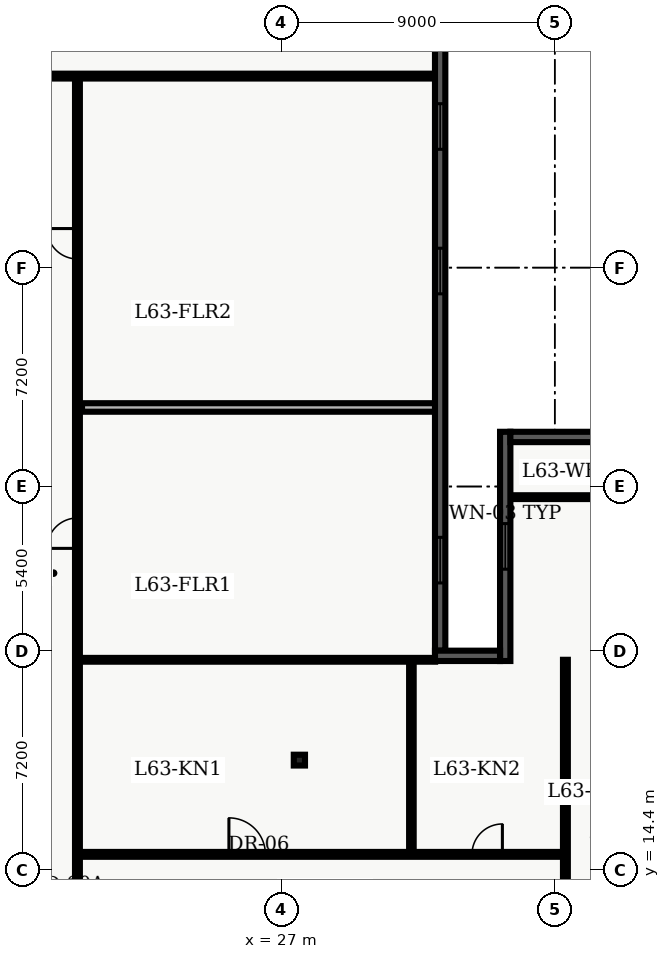
"""IFC4 building model, lengths in metres.
Left out: names, types, materials, properties, quantities, classifications, styles, units other than length and angle.
Written with IfcOpenShell. Run it as: python <this file> out.ifc"""

import sys

from ifc_helpers import new_model, entity, si_unit, converted_unit, direction, frame, origin_with_axes, origin_2d_with_axis, place, context, subcontext, project, spatial, polyline, rectangle, i_section, outline, extrude, element, fill, save


model = new_model("IFC4")
c1 = context("Model", 3, precision=1e-05, world=origin_with_axes(), true_north=direction((0.0, 1.0)))
c2 = subcontext(c1, "Body", "Model", "MODEL_VIEW")
j1 = project(units=[si_unit("LENGTHUNIT", "METRE"), converted_unit("PLANEANGLEUNIT", "DEGREE", entity("IfcPlaneAngleMeasure", 0.017), si_unit("PLANEANGLEUNIT", "RADIAN"), dimensions=[0, 0, 0, 0, 0, 0, 0])], contexts=[c1])
p1 = place(None, origin_with_axes())
s1 = spatial("IfcSite", under=j1, at=p1, CompositionType="ELEMENT")
p2 = place(p1, origin_with_axes())
s2 = spatial("IfcBuilding", under=s1, at=p2, CompositionType="ELEMENT")
p3 = place(p2, frame((0.0, 0.0, 256.8), z_axis=(0.0, 0.0, 1.0), x_axis=(1.0, 0.0, 0.0)))
s3 = spatial("IfcBuildingStorey", under=s2, at=p3, CompositionType="ELEMENT", Elevation=256.8)
p4 = place(p3, frame((27.6, 18.0, 0.0), z_axis=(0.0, 0.0, 1.0), x_axis=(1.0, 0.0, 0.0)))
e1 = element("IfcColumn", 1, at=p4, inside=s3, PredefinedType="COLUMN", context=c2, shape_type="SweptSolid", body=[
    extrude(i_section(OverallWidth=0.369, OverallDepth=0.356, WebThickness=0.011, FlangeThickness=0.018, FilletRadius=0.018, at=origin_2d_with_axis()), origin_with_axes(), (0.0, 0.0, 1.0), 3.9),
])
p5 = place(p3, frame((8.135, 40.5, 0.0), z_axis=(0.0, 0.0, 1.0), x_axis=(1.0, 0.0, 0.0)))
e2 = element("IfcWall", 2, at=p5, inside=s3, PredefinedType="PARTITIONING", context=c2, shape_type="SweptSolid", body=[
    extrude(outline(polyline([(0.0, -0.08), (23.93, -0.08), (23.93, 0.08), (0.0, 0.08), (0.0, -0.08)])), origin_with_axes(), (0.0, 0.0, 1.0), 2.7),
])
p6 = place(p5, frame((0.76, 0.0, 0.0), z_axis=(0.0, 0.0, 1.0), x_axis=(1.0, 0.0, 0.0)))
e3 = element("IfcOpeningElement", 3, at=p6, cuts=e2, PredefinedType="OPENING", context=c2, shape_type="SweptSolid", body=[
    extrude(rectangle(XDim=1.0, YDim=0.18, at=origin_2d_with_axis()), origin_with_axes(), (0.0, 0.0, 1.0), 2.15),
])
p7 = place(p5, frame((7.625, 0.0, 0.0), z_axis=(0.0, 0.0, 1.0), x_axis=(1.0, 0.0, 0.0)))
e4 = element("IfcOpeningElement", 4, at=p7, cuts=e2, PredefinedType="OPENING", context=c2, shape_type="SweptSolid", body=[
    extrude(rectangle(XDim=1.0, YDim=0.18, at=origin_2d_with_axis()), origin_with_axes(), (0.0, 0.0, 1.0), 2.15),
])
p8 = place(p3, frame((20.3, 7.8, 0.0), z_axis=(0.0, 0.0, 1.0), x_axis=(0.0, 1.0, 0.0)))
e5 = element("IfcWall", 5, at=p8, inside=s3, PredefinedType="PARTITIONING", context=c2, shape_type="SweptSolid", body=[
    extrude(outline(polyline([(0.0, -0.08), (32.7, -0.08), (32.7, 0.08), (0.0, 0.08), (0.0, -0.08)])), origin_with_axes(), (0.0, 0.0, 1.0), 2.7),
])
p9 = place(p8, frame((17.665, 0.0, 0.0), z_axis=(0.0, 0.0, 1.0), x_axis=(1.0, 0.0, 0.0)))
e6 = element("IfcOpeningElement", 6, at=p9, cuts=e5, PredefinedType="OPENING", context=c2, shape_type="SweptSolid", body=[
    extrude(rectangle(XDim=1.0, YDim=0.18, at=origin_2d_with_axis()), origin_with_axes(), (0.0, 0.0, 1.0), 2.15),
])
p10 = place(p8, frame((27.185, 0.0, 0.0), z_axis=(0.0, 0.0, 1.0), x_axis=(1.0, 0.0, 0.0)))
e7 = element("IfcOpeningElement", 7, at=p10, cuts=e5, PredefinedType="OPENING", context=c2, shape_type="SweptSolid", body=[
    extrude(rectangle(XDim=1.0, YDim=0.18, at=origin_2d_with_axis()), origin_with_axes(), (0.0, 0.0, 1.0), 2.15),
])
p11 = place(p8, frame((5.775, 0.0, 0.0), z_axis=(0.0, 0.0, 1.0), x_axis=(1.0, 0.0, 0.0)))
e8 = element("IfcOpeningElement", 8, at=p11, cuts=e5, PredefinedType="OPENING", context=c2, shape_type="SweptSolid", body=[
    extrude(rectangle(XDim=1.05, YDim=0.18, at=origin_2d_with_axis()), origin_with_axes(), (0.0, 0.0, 1.0), 2.15),
])
p12 = place(p3, frame((20.45, 29.6, 0.0), z_axis=(0.0, 0.0, 1.0), x_axis=(1.0, 0.0, 0.0)))
e9 = element("IfcWall", 9, at=p12, inside=s3, PredefinedType="PARTITIONING", context=c2, shape_type="SweptSolid", body=[
    extrude(outline(polyline([(0.0, -0.14), (11.615, -0.14), (11.615, 0.14), (0.0, 0.14), (0.0, -0.14)])), origin_with_axes(), (0.0, 0.0, 1.0), 2.7),
])
p13 = place(p3, frame((20.3, 14.9, 0.0), z_axis=(0.0, 0.0, 1.0), x_axis=(1.0, 0.0, 0.0)))
e10 = element("IfcWall", 10, at=p13, inside=s3, PredefinedType="PARTITIONING", context=c2, shape_type="SweptSolid", body=[
    extrude(outline(polyline([(0.0, -0.08), (16.05, -0.08), (16.05, 0.08), (0.0, 0.08), (0.0, -0.08)])), origin_with_axes(), (0.0, 0.0, 1.0), 2.7),
])
p14 = place(p13, frame((5.582, 0.0, 0.0), z_axis=(0.0, 0.0, 1.0), x_axis=(1.0, 0.0, 0.0)))
e11 = element("IfcOpeningElement", 11, at=p14, cuts=e10, PredefinedType="OPENING", context=c2, shape_type="SweptSolid", body=[
    extrude(rectangle(XDim=1.2, YDim=0.18, at=origin_2d_with_axis()), origin_with_axes(), (0.0, 0.0, 1.0), 2.2),
])
p15 = place(p13, frame((13.477, 0.0, 0.0), z_axis=(0.0, 0.0, 1.0), x_axis=(1.0, 0.0, 0.0)))
e12 = element("IfcOpeningElement", 12, at=p15, cuts=e10, PredefinedType="OPENING", context=c2, shape_type="SweptSolid", body=[
    extrude(rectangle(XDim=1.0, YDim=0.18, at=origin_2d_with_axis()), origin_with_axes(), (0.0, 0.0, 1.0), 2.15),
])
p16 = place(p3, frame((36.35, 4.35, 0.0), z_axis=(0.0, 0.0, 1.0), x_axis=(0.0, 1.0, 0.0)))
e13 = element("IfcWall", 13, at=p16, inside=s3, PredefinedType="PARTITIONING", context=c2, shape_type="SweptSolid", body=[
    extrude(outline(polyline([(0.0, -0.08), (16.95, -0.08), (16.95, 0.08), (0.0, 0.08), (0.0, -0.08)])), origin_with_axes(), (0.0, 0.0, 1.0), 2.7),
])
p17 = place(p3, frame((31.284, 15.02, 0.0), z_axis=(0.0, 0.0, 1.0), x_axis=(0.0, 1.0, 0.0)))
e14 = element("IfcWall", 14, at=p17, inside=s3, PredefinedType="PARTITIONING", context=c2, shape_type="SweptSolid", body=[
    extrude(outline(polyline([(0.0, -0.075), (6.2, -0.075), (6.2, 0.075), (0.0, 0.075), (0.0, -0.075)])), origin_with_axes(), (0.0, 0.0, 1.0), 2.7),
])
p18 = place(p3, frame((34.535, 26.65, 0.0), z_axis=(0.0, 0.0, 1.0), x_axis=(1.0, 0.0, 0.0)))
e15 = element("IfcWall", 15, at=p18, inside=s3, PredefinedType="PARTITIONING", context=c2, shape_type="SweptSolid", body=[
    extrude(outline(polyline([(0.0, -0.062), (12.995, -0.062), (12.995, 0.062), (0.0, 0.062), (0.0, -0.062)])), origin_with_axes(), (0.0, 0.0, 1.0), 2.7),
])
p19 = place(p18, frame((8.465, 0.0, 0.0), z_axis=(0.0, 0.0, 1.0), x_axis=(1.0, 0.0, 0.0)))
e16 = element("IfcOpeningElement", 16, at=p19, cuts=e15, PredefinedType="OPENING", context=c2, shape_type="SweptSolid", body=[
    extrude(rectangle(XDim=1.0, YDim=0.145, at=origin_2d_with_axis()), origin_with_axes(), (0.0, 0.0, 1.0), 2.15),
])
p20 = place(p3, frame((20.3, 21.3, 0.0), z_axis=(0.0, 0.0, 1.0), x_axis=(1.0, 0.0, 0.0)))
e17 = element("IfcWall", 17, at=p20, inside=s3, PredefinedType="PARTITIONING", context=c2, shape_type="SweptSolid", body=[
    extrude(outline(polyline([(0.0, -0.062), (11.765, -0.062), (11.765, 0.062), (0.0, 0.062), (0.0, -0.062)])), origin_with_axes(), (0.0, 0.0, 1.0), 2.7),
])
p21 = place(p3, frame((34.37, 21.26, 0.0), z_axis=(0.0, 0.0, 1.0), x_axis=(0.0, 1.0, 0.0)))
e18 = element("IfcWall", 18, at=p21, inside=s3, PredefinedType="SOLIDWALL", context=c2, shape_type="SweptSolid", body=[
    extrude(outline(polyline([(0.0, -0.17), (7.54, -0.17), (7.54, 0.17), (0.0, 0.17), (0.0, -0.17)])), origin_with_axes(), (0.0, 0.0, 1.0), 3.66),
])
p22 = place(p21, frame((3.77, 0.0, 0.45), z_axis=(0.0, 0.0, 1.0), x_axis=(1.0, 0.0, 0.0)))
e19 = element("IfcOpeningElement", 19, at=p22, cuts=e18, PredefinedType="OPENING", context=c2, shape_type="SweptSolid", body=[
    extrude(rectangle(XDim=1.5, YDim=0.36, at=origin_2d_with_axis()), origin_with_axes(), (0.0, 0.0, 1.0), 2.1),
])
p23 = place(p3, frame((34.54, 28.63, 0.0), z_axis=(0.0, 0.0, 1.0), x_axis=(1.0, 0.0, 0.0)))
e20 = element("IfcWall", 20, at=p23, inside=s3, PredefinedType="SOLIDWALL", context=c2, shape_type="SweptSolid", body=[
    extrude(outline(polyline([(0.0, -0.17), (13.16, -0.17), (13.16, 0.17), (0.0, 0.17), (0.0, -0.17)])), origin_with_axes(), (0.0, 0.0, 1.0), 3.66),
])
p24 = place(p23, frame((3.59, 0.0, 0.45), z_axis=(0.0, 0.0, 1.0), x_axis=(1.0, 0.0, 0.0)))
e21 = element("IfcOpeningElement", 21, at=p24, cuts=e20, PredefinedType="OPENING", context=c2, shape_type="SweptSolid", body=[
    extrude(rectangle(XDim=1.5, YDim=0.36, at=origin_2d_with_axis()), origin_with_axes(), (0.0, 0.0, 1.0), 2.1),
])
p25 = place(p23, frame((9.57, 0.0, 0.45), z_axis=(0.0, 0.0, 1.0), x_axis=(1.0, 0.0, 0.0)))
e22 = element("IfcOpeningElement", 22, at=p25, cuts=e20, PredefinedType="OPENING", context=c2, shape_type="SweptSolid", body=[
    extrude(rectangle(XDim=1.5, YDim=0.36, at=origin_2d_with_axis()), origin_with_axes(), (0.0, 0.0, 1.0), 2.1),
])
p26 = place(p3, frame((32.23, 41.82, 0.0), z_axis=(0.0, 0.0, 1.0), x_axis=(0.0, -1.0, 0.0)))
e23 = element("IfcWall", 23, at=p26, inside=s3, PredefinedType="SOLIDWALL", context=c2, shape_type="SweptSolid", body=[
    extrude(outline(polyline([(0.0, -0.17), (20.22, -0.17), (20.22, 0.17), (0.0, 0.17), (0.0, -0.17)])), origin_with_axes(), (0.0, 0.0, 1.0), 3.66),
])
p27 = place(p26, frame((2.978, 0.0, 0.45), z_axis=(0.0, 0.0, 1.0), x_axis=(1.0, 0.0, 0.0)))
e24 = element("IfcOpeningElement", 24, at=p27, cuts=e23, PredefinedType="OPENING", context=c2, shape_type="SweptSolid", body=[
    extrude(rectangle(XDim=1.5, YDim=0.36, at=origin_2d_with_axis()), origin_with_axes(), (0.0, 0.0, 1.0), 2.1),
])
p28 = place(p26, frame((7.732, 0.0, 0.45), z_axis=(0.0, 0.0, 1.0), x_axis=(1.0, 0.0, 0.0)))
e25 = element("IfcOpeningElement", 25, at=p28, cuts=e23, PredefinedType="OPENING", context=c2, shape_type="SweptSolid", body=[
    extrude(rectangle(XDim=1.5, YDim=0.36, at=origin_2d_with_axis()), origin_with_axes(), (0.0, 0.0, 1.0), 2.1),
])
p29 = place(p26, frame((17.242, 0.0, 0.45), z_axis=(0.0, 0.0, 1.0), x_axis=(1.0, 0.0, 0.0)))
e26 = element("IfcOpeningElement", 26, at=p29, cuts=e23, PredefinedType="OPENING", context=c2, shape_type="SweptSolid", body=[
    extrude(rectangle(XDim=1.5, YDim=0.36, at=origin_2d_with_axis()), origin_with_axes(), (0.0, 0.0, 1.0), 2.1),
])
p30 = place(p3, frame((32.06, 21.43, 0.0), z_axis=(0.0, 0.0, 1.0), x_axis=(1.0, 0.0, 0.0)))
e27 = element("IfcWall", 27, at=p30, inside=s3, PredefinedType="SOLIDWALL", context=c2, shape_type="SweptSolid", body=[
    extrude(outline(polyline([(0.0, -0.17), (2.14, -0.17), (2.14, 0.17), (0.0, 0.17), (0.0, -0.17)])), origin_with_axes(), (0.0, 0.0, 1.0), 3.66),
])
p31 = place(p8, frame((17.665, 0.0, 0.0), z_axis=(0.0, 0.0, 1.0), x_axis=(1.0, 0.0, 0.0)))
e28 = element("IfcDoor", 28, at=p31, inside=s3, OperationType="SINGLE_SWING_LEFT", PredefinedType="DOOR", context=c2, shape_type="SweptSolid", body=[
    extrude(rectangle(XDim=1.0, YDim=0.09, at=origin_2d_with_axis()), origin_with_axes(), (0.0, 0.0, 1.0), 2.15),
])
fill(e6, e28)
p32 = place(p8, frame((27.185, 0.0, 0.0), z_axis=(0.0, 0.0, 1.0), x_axis=(1.0, 0.0, 0.0)))
e29 = element("IfcDoor", 29, at=p32, inside=s3, OperationType="SINGLE_SWING_RIGHT", PredefinedType="DOOR", context=c2, shape_type="SweptSolid", body=[
    extrude(rectangle(XDim=1.0, YDim=0.09, at=origin_2d_with_axis()), origin_with_axes(), (0.0, 0.0, 1.0), 2.15),
])
fill(e7, e29)
p33 = place(p8, frame((5.775, 0.0, 0.0), z_axis=(0.0, 0.0, 1.0), x_axis=(1.0, 0.0, 0.0)))
e30 = element("IfcDoor", 30, at=p33, inside=s3, OperationType="SINGLE_SWING_LEFT", PredefinedType="DOOR", context=c2, shape_type="SweptSolid", body=[
    extrude(rectangle(XDim=1.05, YDim=0.09, at=origin_2d_with_axis()), origin_with_axes(), (0.0, 0.0, 1.0), 2.15),
])
fill(e8, e30)
p34 = place(p13, frame((5.582, 0.0, 0.0), z_axis=(0.0, 0.0, 1.0), x_axis=(1.0, 0.0, 0.0)))
e31 = element("IfcDoor", 31, at=p34, inside=s3, OperationType="SINGLE_SWING_LEFT", PredefinedType="DOOR", context=c2, shape_type="SweptSolid", body=[
    extrude(rectangle(XDim=1.2, YDim=0.09, at=origin_2d_with_axis()), origin_with_axes(), (0.0, 0.0, 1.0), 2.2),
])
fill(e11, e31)
p35 = place(p13, frame((13.477, 0.0, 0.0), z_axis=(0.0, 0.0, 1.0), x_axis=(1.0, 0.0, 0.0)))
e32 = element("IfcDoor", 32, at=p35, inside=s3, OperationType="SINGLE_SWING_RIGHT", PredefinedType="DOOR", context=c2, shape_type="SweptSolid", body=[
    extrude(rectangle(XDim=1.0, YDim=0.09, at=origin_2d_with_axis()), origin_with_axes(), (0.0, 0.0, 1.0), 2.15),
])
fill(e12, e32)
p36 = place(p21, frame((3.77, 0.0, 0.45), z_axis=(0.0, 0.0, 1.0), x_axis=(1.0, 0.0, 0.0)))
e33 = element("IfcWindow", 33, at=p36, inside=s3, PredefinedType="WINDOW", context=c2, shape_type="SweptSolid", body=[
    extrude(rectangle(XDim=1.5, YDim=0.09, at=origin_2d_with_axis()), origin_with_axes(), (0.0, 0.0, 1.0), 2.1),
])
fill(e19, e33)
p37 = place(p26, frame((2.978, 0.0, 0.45), z_axis=(0.0, 0.0, 1.0), x_axis=(1.0, 0.0, 0.0)))
e34 = element("IfcWindow", 34, at=p37, inside=s3, PredefinedType="WINDOW", context=c2, shape_type="SweptSolid", body=[
    extrude(rectangle(XDim=1.5, YDim=0.09, at=origin_2d_with_axis()), origin_with_axes(), (0.0, 0.0, 1.0), 2.1),
])
fill(e24, e34)
p38 = place(p26, frame((7.732, 0.0, 0.45), z_axis=(0.0, 0.0, 1.0), x_axis=(1.0, 0.0, 0.0)))
e35 = element("IfcWindow", 35, at=p38, inside=s3, PredefinedType="WINDOW", context=c2, shape_type="SweptSolid", body=[
    extrude(rectangle(XDim=1.5, YDim=0.09, at=origin_2d_with_axis()), origin_with_axes(), (0.0, 0.0, 1.0), 2.1),
])
fill(e25, e35)
p39 = place(p26, frame((17.242, 0.0, 0.45), z_axis=(0.0, 0.0, 1.0), x_axis=(1.0, 0.0, 0.0)))
e36 = element("IfcWindow", 36, at=p39, inside=s3, PredefinedType="WINDOW", context=c2, shape_type="SweptSolid", body=[
    extrude(rectangle(XDim=1.5, YDim=0.09, at=origin_2d_with_axis()), origin_with_axes(), (0.0, 0.0, 1.0), 2.1),
])
fill(e26, e36)
save(model, sys.argv[1])
